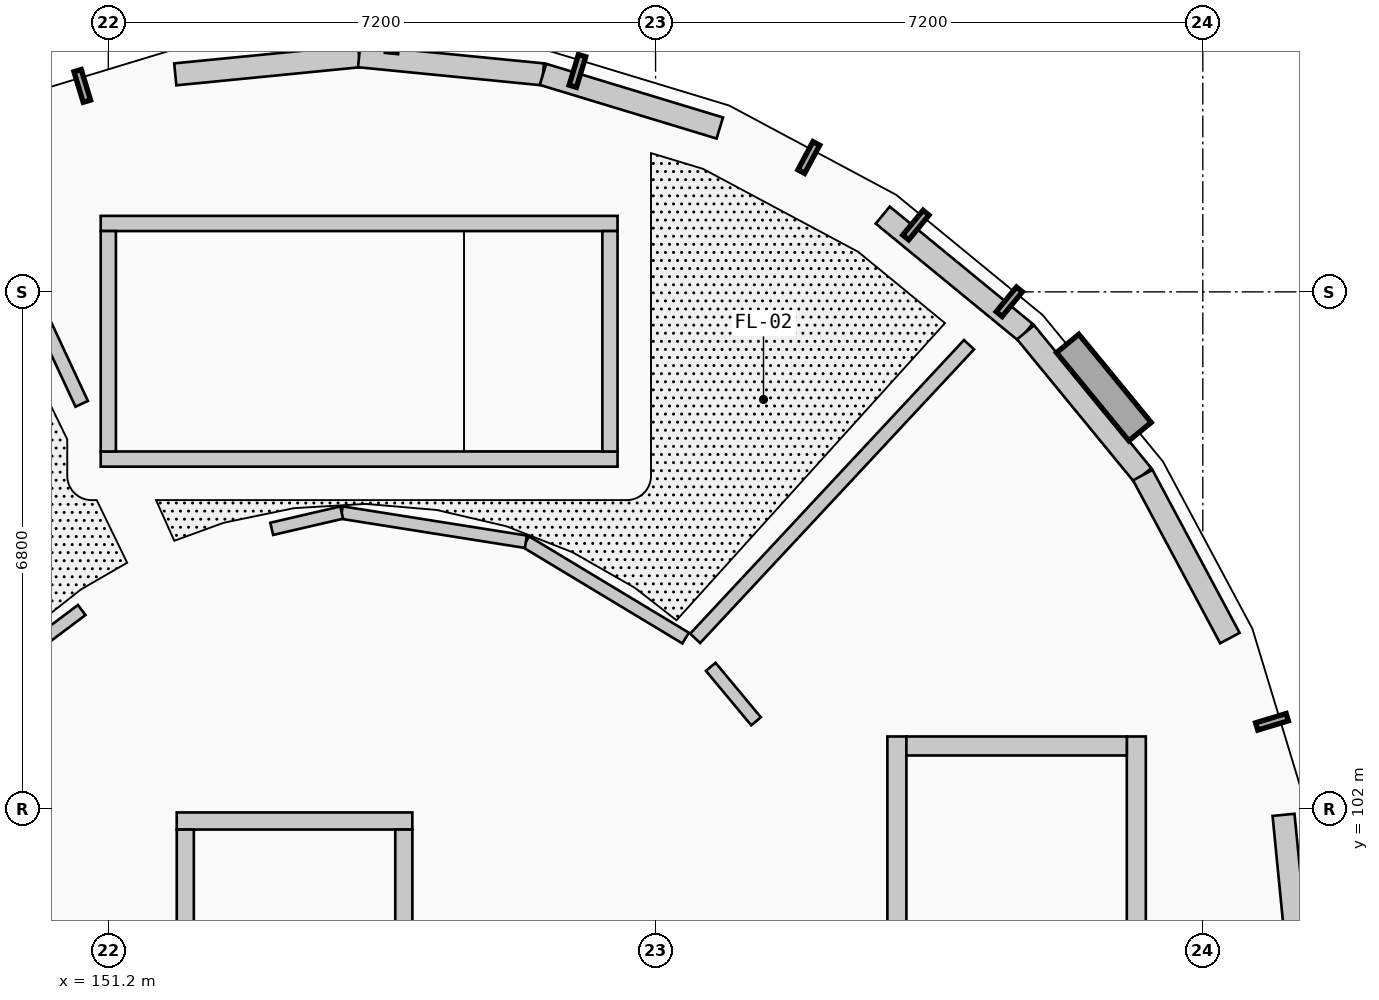
"""IFC4 building model, lengths in metres.
Left out: names, types, materials, properties, quantities, classifications, styles, units other than length and angle.
Written with IfcOpenShell. Run it as: python <this file> out.ifc"""

import sys

from ifc_helpers import new_model, si_unit, direction, frame, frame_2d, origin, origin_2d, place, context, subcontext, project, spatial, rectangle, extrude, element, fill, save


model = new_model("IFC4")
c1 = context("Model", 3, precision=1e-05, world=origin(), true_north=direction((0.0, 1.0)))
c2 = subcontext(c1, "Body", "Model", "MODEL_VIEW")
j1 = project(units=[si_unit("LENGTHUNIT", "METRE"), si_unit("PLANEANGLEUNIT", "RADIAN")], contexts=[c1])
p1 = place(None, origin())
s1 = spatial("IfcSite", under=j1, at=p1, CompositionType="ELEMENT")
p2 = place(p1, origin())
s2 = spatial("IfcBuilding", under=s1, at=p2, CompositionType="ELEMENT")
p3 = place(p2, frame((0.0, 0.0, 4.55)))
s3 = spatial("IfcBuildingStorey", under=s2, at=p3, CompositionType="ELEMENT", Elevation=4.55)
for number, where, z_axis, x_axis in (
    (1, (165.476, 104.046, 0.0), (0.0, 0.0, 1.0), (1.0, 0.0, 0.0)),
    (2, (162.9, 107.9, 0.0), (0.0, 0.0, 1.0), (1.0, 0.0, 0.0)),
    (3, (159.046, 110.476, 0.0), (0.0, 0.0, 1.0), (1.0, 0.0, 0.0)),
    (4, (154.5, 111.38, 0.0), (0.0, 0.0, 1.0), (1.0, 0.0, 0.0)),
    (5, (159.025, 104.025, 0.0), (0.0, 0.0, 1.0), (1.0, 0.0, 0.0)),
):
    element("IfcColumn", number, at=place(p3, frame(where, z_axis=z_axis, x_axis=x_axis)), inside=s3, PredefinedType="COLUMN", context=c2, shape_type="SweptSolid", body=[
        extrude(rectangle(XDim=0.365, YDim=0.365, at=origin_2d()), origin(), (0.0, 0.0, 1.0), 4.2),
    ])
for number, where, z_axis, x_axis in (
    (6, (152.081, 111.662, 0.0), (0.0, 0.0, 1.0), (0.995, 0.098, 0.0)),
    (7, (154.5, 111.9, 0.0), (0.0, 0.0, 1.0), (0.995, -0.098, 0.0)),
):
    element("IfcWall", number, at=place(p3, frame(where, z_axis=z_axis, x_axis=x_axis)), inside=s3, PredefinedType="ELEMENTEDWALL", context=c2, shape_type="SweptSolid", body=[
        extrude(rectangle(XDim=2.431, YDim=0.29, at=frame_2d((1.215, 0.0))), origin(), (0.0, 0.0, 1.0), 3.309),
    ])
p4 = place(p3, frame((156.919, 111.662, 0.0), z_axis=(0.0, 0.0, 1.0), x_axis=(0.956892539407, -0.290442193951, 0.0)))
e8 = element("IfcWall", 8, at=p4, inside=s3, PredefinedType="ELEMENTEDWALL", context=c2, shape_type="SweptSolid", body=[
    extrude(rectangle(XDim=2.431, YDim=0.29, at=frame_2d((1.215, 0.0))), origin(), (0.0, 0.0, 1.0), 3.309),
])
p5 = place(p4, frame((0.625, 0.0, 0.85)))
e9 = element("IfcOpeningElement", 9, at=p5, cuts=e8, PredefinedType="OPENING", context=c2, shape_type="SweptSolid", body=[
    extrude(rectangle(XDim=1.18, YDim=1.85, at=frame_2d((0.59, 0.925))), frame((0.0, 0.155, 0.0), z_axis=(0.0, -1.0, 0.0), x_axis=(1.0, 0.0, 0.0)), (0.0, 0.0, 1.0), 0.31),
])
p6 = place(p3, frame((161.389, 109.81, 0.0), z_axis=(0.0, 0.0, 1.0), x_axis=(0.773048113134, -0.634347392822, 0.0)))
e10 = element("IfcWall", 10, at=p6, inside=s3, PredefinedType="ELEMENTEDWALL", context=c2, shape_type="SweptSolid", body=[
    extrude(rectangle(XDim=2.431, YDim=0.29, at=frame_2d((1.215, 0.0))), origin(), (0.0, 0.0, 1.0), 3.309),
])
p7 = place(p6, frame((0.615, 0.0, 0.85)))
e11 = element("IfcOpeningElement", 11, at=p7, cuts=e10, PredefinedType="OPENING", context=c2, shape_type="SweptSolid", body=[
    extrude(rectangle(XDim=1.2, YDim=1.35, at=frame_2d((0.6, 0.675))), frame((0.0, 0.155, 0.0), z_axis=(0.0, -1.0, 0.0), x_axis=(1.0, 0.0, 0.0)), (0.0, 0.0, 1.0), 0.31),
])
p8 = place(p3, frame((163.268, 108.268, 0.0), z_axis=(0.0, 0.0, 1.0), x_axis=(0.634347392822, -0.773048113134, 0.0)))
e12 = element("IfcWall", 12, at=p8, inside=s3, PredefinedType="ELEMENTEDWALL", context=c2, shape_type="SweptSolid", body=[
    extrude(rectangle(XDim=2.431, YDim=0.29, at=frame_2d((1.215, 0.0))), origin(), (0.0, 0.0, 1.0), 3.309),
])
p9 = place(p8, frame((0.615, 0.0, 0.85)))
e13 = element("IfcOpeningElement", 13, at=p9, cuts=e12, PredefinedType="OPENING", context=c2, shape_type="SweptSolid", body=[
    extrude(rectangle(XDim=1.2, YDim=1.65, at=frame_2d((0.6, 0.825))), frame((0.0, 0.155, 0.0), z_axis=(0.0, -1.0, 0.0), x_axis=(1.0, 0.0, 0.0)), (0.0, 0.0, 1.0), 0.31),
])
p10 = place(p3, frame((164.81, 106.389, 0.0), z_axis=(0.0, 0.0, 1.0), x_axis=(0.471432490996, -0.881902152415, 0.0)))
e14 = element("IfcWall", 14, at=p10, inside=s3, PredefinedType="ELEMENTEDWALL", context=c2, shape_type="SweptSolid", body=[
    extrude(rectangle(XDim=2.431, YDim=0.29, at=frame_2d((1.215, 0.0))), origin(), (0.0, 0.0, 1.0), 3.309),
])
p11 = place(p10, frame((0.616, 0.0, 0.85)))
e15 = element("IfcOpeningElement", 15, at=p11, cuts=e14, PredefinedType="OPENING", context=c2, shape_type="SweptSolid", body=[
    extrude(rectangle(XDim=1.2, YDim=1.95, at=frame_2d((0.6, 0.975))), frame((0.0, 0.155, 0.0), z_axis=(0.0, -1.0, 0.0), x_axis=(1.0, 0.0, 0.0)), (0.0, 0.0, 1.0), 0.31),
])
p12 = place(p3, frame((166.662, 101.919, 0.0), z_axis=(0.0, 0.0, 1.0), x_axis=(0.097832820839, -0.995202863323, 0.0)))
e16 = element("IfcWall", 16, at=p12, inside=s3, PredefinedType="ELEMENTEDWALL", context=c2, shape_type="SweptSolid", body=[
    extrude(rectangle(XDim=2.431, YDim=0.29, at=frame_2d((1.215, 0.0))), origin(), (0.0, 0.0, 1.0), 3.309),
])
p13 = place(p3, frame((161.575, 102.95, 0.0), z_axis=(0.0, 0.0, 1.0), x_axis=(0.0, -1.0, 0.0)))
e17 = element("IfcWall", 17, at=p13, inside=s3, PredefinedType="SHEAR", context=c2, shape_type="SweptSolid", body=[
    extrude(rectangle(XDim=6.9, YDim=0.25, at=frame_2d((3.45, 0.0))), origin(), (0.0, 0.0, 1.0), 3.955),
])
p14 = place(p13, frame((0.43, 0.0, 0.0)))
e18 = element("IfcOpeningElement", 18, at=p14, cuts=e17, PredefinedType="OPENING", context=c2, shape_type="SweptSolid", body=[
    extrude(rectangle(XDim=1.1, YDim=2.15, at=frame_2d((0.55, 1.075))), frame((0.0, 0.135, 0.0), z_axis=(0.0, -1.0, 0.0), x_axis=(1.0, 0.0, 0.0)), (0.0, 0.0, 1.0), 0.27),
])
p15 = place(p3, frame((164.725, 102.95, 0.0), z_axis=(0.0, 0.0, 1.0), x_axis=(0.0, -1.0, 0.0)))
e19 = element("IfcWall", 19, at=p15, inside=s3, PredefinedType="SHEAR", context=c2, shape_type="SweptSolid", body=[
    extrude(rectangle(XDim=6.9, YDim=0.25, at=frame_2d((3.45, 0.0))), origin(), (0.0, 0.0, 1.0), 3.955),
])
p16 = place(p3, frame((161.7, 102.825, 0.0), z_axis=(0.0, 0.0, 1.0), x_axis=(1.0, 0.0, 0.0)))
e20 = element("IfcWall", 20, at=p16, inside=s3, PredefinedType="SHEAR", context=c2, shape_type="SweptSolid", body=[
    extrude(rectangle(XDim=2.9, YDim=0.25, at=frame_2d((1.45, 0.0))), origin(), (0.0, 0.0, 1.0), 3.955),
])
p17 = place(p3, frame((151.1, 106.6, 0.0), z_axis=(0.0, 0.0, 1.0), x_axis=(1.0, 0.0, 0.0)))
e21 = element("IfcWall", 21, at=p17, inside=s3, PredefinedType="SHEAR", context=c2, shape_type="SweptSolid", body=[
    extrude(rectangle(XDim=6.8, YDim=0.2, at=frame_2d((3.4, 0.0))), origin(), (0.0, 0.0, 1.0), 3.955),
])
p18 = place(p17, frame((0.38, 0.0, 0.0)))
e22 = element("IfcOpeningElement", 22, at=p18, cuts=e21, PredefinedType="OPENING", context=c2, shape_type="SweptSolid", body=[
    extrude(rectangle(XDim=1.05, YDim=2.15, at=frame_2d((0.525, 1.075))), frame((0.0, 0.11, 0.0), z_axis=(0.0, -1.0, 0.0), x_axis=(1.0, 0.0, 0.0)), (0.0, 0.0, 1.0), 0.22),
])
p19 = place(p3, frame((151.1, 109.7, 0.0), z_axis=(0.0, 0.0, 1.0), x_axis=(1.0, 0.0, 0.0)))
e23 = element("IfcWall", 23, at=p19, inside=s3, PredefinedType="SHEAR", context=c2, shape_type="SweptSolid", body=[
    extrude(rectangle(XDim=6.8, YDim=0.2, at=frame_2d((3.4, 0.0))), origin(), (0.0, 0.0, 1.0), 3.955),
])
for number, where, z_axis, x_axis in (
    (24, (151.2, 106.7, 0.0), (0.0, 0.0, 1.0), (0.0, 1.0, 0.0)),
    (25, (157.8, 106.7, 0.0), (0.0, 0.0, 1.0), (0.0, 1.0, 0.0)),
):
    element("IfcWall", number, at=place(p3, frame(where, z_axis=z_axis, x_axis=x_axis)), inside=s3, PredefinedType="SHEAR", context=c2, shape_type="SweptSolid", body=[
        extrude(rectangle(XDim=2.9, YDim=0.2, at=frame_2d((1.45, 0.0))), origin(), (0.0, 0.0, 1.0), 3.955),
    ])
p20 = place(p3, frame((152.1, 101.838, 0.0), z_axis=(0.0, 0.0, 1.0), x_axis=(1.0, 0.0, 0.0)))
e26 = element("IfcWall", 26, at=p20, inside=s3, PredefinedType="SHEAR", context=c2, shape_type="SweptSolid", body=[
    extrude(rectangle(XDim=3.1, YDim=0.225, at=frame_2d((1.55, 0.0))), origin(), (0.0, 0.0, 1.0), 3.955),
])
for number, where, z_axis, x_axis in (
    (27, (152.213, 99.575, 0.0), (0.0, 0.0, 1.0), (0.0, 1.0, 0.0)),
    (28, (155.088, 99.575, 0.0), (0.0, 0.0, 1.0), (0.0, 1.0, 0.0)),
):
    element("IfcWall", number, at=place(p3, frame(where, z_axis=z_axis, x_axis=x_axis)), inside=s3, PredefinedType="SHEAR", context=c2, shape_type="SweptSolid", body=[
        extrude(rectangle(XDim=2.15, YDim=0.225, at=frame_2d((1.075, 0.0))), origin(), (0.0, 0.0, 1.0), 3.955),
    ])
p21 = place(p3, frame((158.921, 104.241, 0.0), z_axis=(0.0, 0.0, 1.0), x_axis=(0.681975712302, 0.731374820342, 0.0)))
e29 = element("IfcWall", 29, at=p21, inside=s3, PredefinedType="PARTITIONING", context=c2, shape_type="SweptSolid", body=[
    extrude(rectangle(XDim=5.283, YDim=0.18, at=frame_2d((2.642, 0.0))), origin(), (0.0, 0.0, 1.0), 3.284),
])
p22 = place(p3, frame((150.85, 107.327, 0.0), z_axis=(0.0, 0.0, 1.0), x_axis=(-0.422718541288, 0.906261019162, 0.0)))
e30 = element("IfcWall", 30, at=p22, inside=s3, PredefinedType="PARTITIONING", context=c2, shape_type="SweptSolid", body=[
    extrude(rectangle(XDim=3.123, YDim=0.18, at=frame_2d((1.562, 0.0))), origin(), (0.0, 0.0, 1.0), 3.284),
])
p23 = place(p3, frame((158.795, 104.245, 0.0), z_axis=(0.0, 0.0, 1.0), x_axis=(-0.856349289231, 0.51639703217, 0.0)))
e31 = element("IfcWall", 31, at=p23, inside=s3, PredefinedType="PARTITIONING", context=c2, shape_type="SweptSolid", body=[
    extrude(rectangle(XDim=2.453, YDim=0.165, at=frame_2d((1.227, 0.0))), origin(), (0.0, 0.0, 1.0), 3.284),
])
p24 = place(p23, frame((0.477, 0.0, 0.0)))
e32 = element("IfcOpeningElement", 32, at=p24, cuts=e31, PredefinedType="OPENING", context=c2, shape_type="SweptSolid", body=[
    extrude(rectangle(XDim=1.5, YDim=2.3, at=frame_2d((0.75, 1.15))), frame((0.0, 0.093, 0.0), z_axis=(0.0, -1.0, 0.0), x_axis=(1.0, 0.0, 0.0)), (0.0, 0.0, 1.0), 0.185),
])
p25 = place(p3, frame((156.694, 105.512, 0.0), z_axis=(0.0, 0.0, 1.0), x_axis=(-0.987672430412, 0.156534884941, 0.0)))
e33 = element("IfcWall", 33, at=p25, inside=s3, PredefinedType="PARTITIONING", context=c2, shape_type="SweptSolid", body=[
    extrude(rectangle(XDim=2.453, YDim=0.165, at=frame_2d((1.227, 0.0))), origin(), (0.0, 0.0, 1.0), 3.284),
])
p26 = place(p3, frame((154.271, 105.896, 0.0), z_axis=(0.0, 0.0, 1.0), x_axis=(-0.974019949823, -0.226462220571, 0.0)))
e34 = element("IfcWall", 34, at=p26, inside=s3, PredefinedType="PARTITIONING", context=c2, shape_type="SweptSolid", body=[
    extrude(rectangle(XDim=0.946, YDim=0.165, at=frame_2d((0.473, 0.0))), origin(), (0.0, 0.0, 1.0), 3.284),
])
p27 = place(p3, frame((150.85, 104.614, 0.0), z_axis=(0.0, 0.0, 1.0), x_axis=(-0.799731853613, -0.600357362174, 0.0)))
e35 = element("IfcWall", 35, at=p27, inside=s3, PredefinedType="PARTITIONING", context=c2, shape_type="SweptSolid", body=[
    extrude(rectangle(XDim=0.874, YDim=0.165, at=frame_2d((0.437, 0.0))), origin(), (0.0, 0.0, 1.0), 3.284),
])
p28 = place(p3, frame((159.722, 103.15, 0.0), z_axis=(0.0, 0.0, 1.0), x_axis=(-0.639179373109, 0.769057688988, 0.0)))
e36 = element("IfcWall", 36, at=p28, inside=s3, PredefinedType="PARTITIONING", context=c2, shape_type="SweptSolid", body=[
    extrude(rectangle(XDim=0.932, YDim=0.165, at=frame_2d((0.466, 0.0))), origin(), (0.0, 0.0, 1.0), 3.284),
])
p29 = place(p5, origin())
e37 = element("IfcWindow", 37, at=p29, inside=s3, PartitioningType="SINGLE_PANEL", PredefinedType="WINDOW", context=c2, shape_type="SweptSolid", body=[
    extrude(rectangle(XDim=1.18, YDim=1.85, at=frame_2d((0.59, 0.925))), frame((0.0, 0.03, 0.0), z_axis=(0.0, -1.0, 0.0), x_axis=(1.0, 0.0, 0.0)), (0.0, 0.0, 1.0), 0.06),
])
fill(e9, e37)
p30 = place(p7, origin())
e38 = element("IfcWindow", 38, at=p30, inside=s3, PartitioningType="SINGLE_PANEL", PredefinedType="WINDOW", context=c2, shape_type="SweptSolid", body=[
    extrude(rectangle(XDim=1.2, YDim=1.35, at=frame_2d((0.6, 0.675))), frame((0.0, 0.03, 0.0), z_axis=(0.0, -1.0, 0.0), x_axis=(1.0, 0.0, 0.0)), (0.0, 0.0, 1.0), 0.06),
])
fill(e11, e38)
p31 = place(p9, origin())
e39 = element("IfcWindow", 39, at=p31, inside=s3, PartitioningType="SINGLE_PANEL", PredefinedType="WINDOW", context=c2, shape_type="SweptSolid", body=[
    extrude(rectangle(XDim=1.2, YDim=1.65, at=frame_2d((0.6, 0.825))), frame((0.0, 0.03, 0.0), z_axis=(0.0, -1.0, 0.0), x_axis=(1.0, 0.0, 0.0)), (0.0, 0.0, 1.0), 0.06),
])
fill(e13, e39)
p32 = place(p11, origin())
e40 = element("IfcWindow", 40, at=p32, inside=s3, PartitioningType="SINGLE_PANEL", PredefinedType="WINDOW", context=c2, shape_type="SweptSolid", body=[
    extrude(rectangle(XDim=1.2, YDim=1.95, at=frame_2d((0.6, 0.975))), frame((0.0, 0.03, 0.0), z_axis=(0.0, -1.0, 0.0), x_axis=(1.0, 0.0, 0.0)), (0.0, 0.0, 1.0), 0.06),
])
fill(e15, e40)
p33 = place(p14, origin())
e41 = element("IfcDoor", 41, at=p33, inside=s3, OperationType="SINGLE_SWING_LEFT", PredefinedType="DOOR", context=c2, shape_type="SweptSolid", body=[
    extrude(rectangle(XDim=1.1, YDim=2.15, at=frame_2d((0.55, 1.075))), frame((0.0, 0.025, 0.0), z_axis=(0.0, -1.0, 0.0), x_axis=(1.0, 0.0, 0.0)), (0.0, 0.0, 1.0), 0.05),
])
fill(e18, e41)
p34 = place(p18, origin())
e42 = element("IfcDoor", 42, at=p34, inside=s3, OperationType="SINGLE_SWING_RIGHT", PredefinedType="DOOR", context=c2, shape_type="SweptSolid", body=[
    extrude(rectangle(XDim=1.05, YDim=2.15, at=frame_2d((0.525, 1.075))), frame((0.0, 0.025, 0.0), z_axis=(0.0, -1.0, 0.0), x_axis=(1.0, 0.0, 0.0)), (0.0, 0.0, 1.0), 0.05),
])
fill(e22, e42)
p35 = place(p24, origin())
e43 = element("IfcDoor", 43, at=p35, inside=s3, OperationType="SINGLE_SWING_LEFT", PredefinedType="DOOR", context=c2, shape_type="SweptSolid", body=[
    extrude(rectangle(XDim=1.5, YDim=2.3, at=frame_2d((0.75, 1.15))), frame((0.0, 0.025, 0.0), z_axis=(0.0, -1.0, 0.0), x_axis=(1.0, 0.0, 0.0)), (0.0, 0.0, 1.0), 0.05),
])
fill(e32, e43)
save(model, sys.argv[1])
